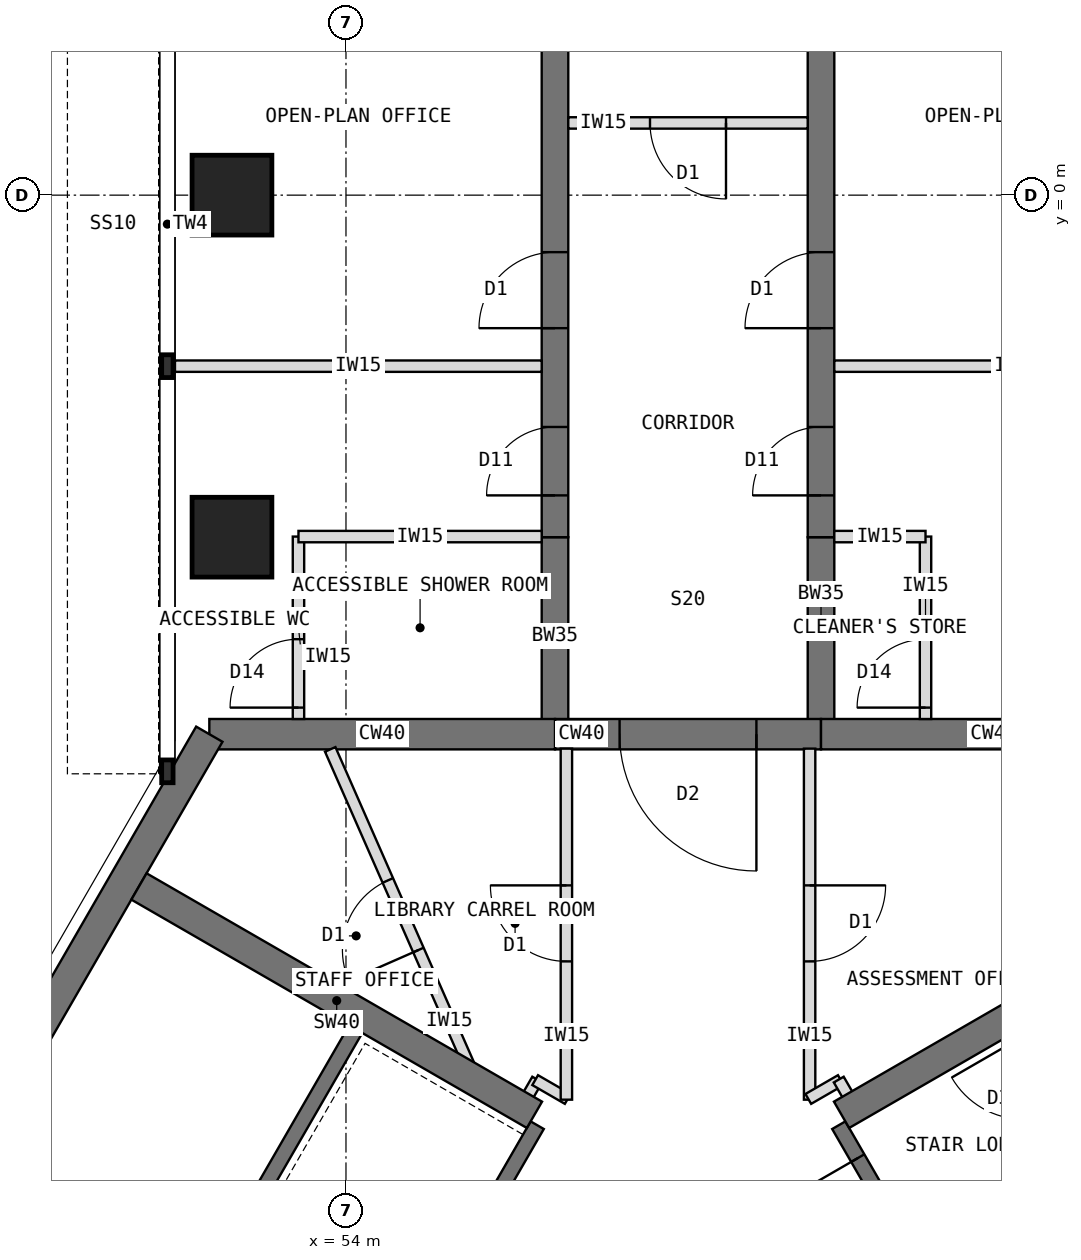
"""IFC4 building model, lengths in metres.
Left out: names, types, materials, properties, quantities, classifications, styles, units other than length and angle.
Written with IfcOpenShell. Run it as: python <this file> out.ifc"""

import sys

from ifc_helpers import new_model, si_unit, direction, frame, frame_2d, origin, origin_2d, place, context, subcontext, project, spatial, rectangle, extrude, element, fill, save


model = new_model("IFC4")
c1 = context("Model", 3, precision=1e-05, world=origin(), true_north=direction((0.0, 1.0)))
c2 = subcontext(c1, "Body", "Model", "MODEL_VIEW")
j1 = project(units=[si_unit("LENGTHUNIT", "METRE"), si_unit("PLANEANGLEUNIT", "RADIAN")], contexts=[c1])
p1 = place(None, origin())
s1 = spatial("IfcSite", under=j1, at=p1, CompositionType="ELEMENT")
p2 = place(p1, origin())
s2 = spatial("IfcBuilding", under=s1, at=p2, CompositionType="ELEMENT")
p3 = place(p2, frame((0.0, 0.0, 247.5)))
s3 = spatial("IfcBuildingStorey", under=s2, at=p3, CompositionType="ELEMENT", Elevation=247.5)
p4 = place(p3, frame((64.798, -7.092, 0.0), z_axis=(0.0, 0.0, 1.0), x_axis=(-1.0, 0.0, 0.0)))
e1 = element("IfcWall", 1, at=p4, inside=s3, PredefinedType="SHEAR", context=c2, shape_type="SweptSolid", body=[
    extrude(rectangle(XDim=4.548, YDim=0.4, at=frame_2d((2.274, 0.0))), origin(), (0.0, 0.0, 1.0), 4.0),
])
p5 = place(p3, frame((60.25, -7.092, 0.0), z_axis=(0.0, 0.0, 1.0), x_axis=(-1.0, 0.0, 0.0)))
e2 = element("IfcWall", 2, at=p5, inside=s3, PredefinedType="SHEAR", context=c2, shape_type="SweptSolid", body=[
    extrude(rectangle(XDim=3.5, YDim=0.4, at=frame_2d((1.75, 0.0))), origin(), (0.0, 0.0, 1.0), 4.0),
])
p6 = place(p5, frame((0.85, 0.0, 0.0)))
e3 = element("IfcOpeningElement", 3, at=p6, cuts=e2, PredefinedType="OPENING", context=c2, shape_type="SweptSolid", body=[
    extrude(rectangle(XDim=1.8, YDim=2.1, at=frame_2d((0.9, 1.05))), frame((0.0, 0.21, 0.0), z_axis=(0.0, -1.0, 0.0), x_axis=(1.0, 0.0, 0.0)), (0.0, 0.0, 1.0), 0.42),
])
p7 = place(p3, frame((56.75, -7.092, 0.0), z_axis=(0.0, 0.0, 1.0), x_axis=(-1.0, 0.0, 0.0)))
e4 = element("IfcWall", 4, at=p7, inside=s3, PredefinedType="SHEAR", context=c2, shape_type="SweptSolid", body=[
    extrude(rectangle(XDim=4.548, YDim=0.4, at=frame_2d((2.274, 0.0))), origin(), (0.0, 0.0, 1.0), 4.0),
])
p8 = place(p3, frame((52.202, -7.092, 0.0), z_axis=(0.0, 0.0, 1.0), x_axis=(-0.500005998175, -0.866021940709, 0.0)))
e5 = element("IfcWall", 5, at=p8, inside=s3, PredefinedType="SHEAR", context=c2, shape_type="SweptSolid", body=[
    extrude(rectangle(XDim=12.596, YDim=0.4, at=frame_2d((6.298, 0.0))), origin(), (0.0, 0.0, 1.0), 4.0),
])
p9 = place(p3, frame((56.75, -7.092, 0.0), z_axis=(0.0, 0.0, 1.0), x_axis=(0.0, 1.0, 0.0)))
e6 = element("IfcWall", 6, at=p9, inside=s3, PredefinedType="SHEAR", context=c2, shape_type="SweptSolid", body=[
    extrude(rectangle(XDim=2.592, YDim=0.35, at=frame_2d((1.296, 0.0))), origin(), (0.0, 0.0, 1.0), 4.0),
])
p10 = place(p3, frame((56.75, -4.5, 0.0), z_axis=(0.0, 0.0, 1.0), x_axis=(0.0, 1.0, 0.0)))
e7 = element("IfcWall", 7, at=p10, inside=s3, PredefinedType="SHEAR", context=c2, shape_type="SweptSolid", body=[
    extrude(rectangle(XDim=13.2, YDim=0.35, at=frame_2d((6.6, 0.0))), origin(), (0.0, 0.0, 1.0), 4.0),
])
p11 = place(p10, frame((0.55, 0.0, 0.0)))
e8 = element("IfcOpeningElement", 8, at=p11, cuts=e7, PredefinedType="OPENING", context=c2, shape_type="SweptSolid", body=[
    extrude(rectangle(XDim=0.9, YDim=2.1, at=frame_2d((0.45, 1.05))), frame((0.0, 0.185, 0.0), z_axis=(0.0, -1.0, 0.0), x_axis=(1.0, 0.0, 0.0)), (0.0, 0.0, 1.0), 0.37),
])
p12 = place(p10, frame((2.75, 0.0, 0.0)))
e9 = element("IfcOpeningElement", 9, at=p12, cuts=e7, PredefinedType="OPENING", context=c2, shape_type="SweptSolid", body=[
    extrude(rectangle(XDim=1.0, YDim=2.1, at=frame_2d((0.5, 1.05))), frame((0.0, 0.185, 0.0), z_axis=(0.0, -1.0, 0.0), x_axis=(1.0, 0.0, 0.0)), (0.0, 0.0, 1.0), 0.37),
])
p13 = place(p3, frame((60.25, -7.092, 0.0), z_axis=(0.0, 0.0, 1.0), x_axis=(0.0, 1.0, 0.0)))
e10 = element("IfcWall", 10, at=p13, inside=s3, PredefinedType="SHEAR", context=c2, shape_type="SweptSolid", body=[
    extrude(rectangle(XDim=2.592, YDim=0.35, at=frame_2d((1.296, 0.0))), origin(), (0.0, 0.0, 1.0), 4.0),
])
p14 = place(p3, frame((60.25, -4.5, 0.0), z_axis=(0.0, 0.0, 1.0), x_axis=(0.0, 1.0, 0.0)))
e11 = element("IfcWall", 11, at=p14, inside=s3, PredefinedType="SHEAR", context=c2, shape_type="SweptSolid", body=[
    extrude(rectangle(XDim=13.2, YDim=0.35, at=frame_2d((6.6, 0.0))), origin(), (0.0, 0.0, 1.0), 4.0),
])
p15 = place(p14, frame((0.55, 0.0, 0.0)))
e12 = element("IfcOpeningElement", 12, at=p15, cuts=e11, PredefinedType="OPENING", context=c2, shape_type="SweptSolid", body=[
    extrude(rectangle(XDim=0.9, YDim=2.1, at=frame_2d((0.45, 1.05))), frame((0.0, 0.185, 0.0), z_axis=(0.0, -1.0, 0.0), x_axis=(1.0, 0.0, 0.0)), (0.0, 0.0, 1.0), 0.37),
])
p16 = place(p14, frame((2.75, 0.0, 0.0)))
e13 = element("IfcOpeningElement", 13, at=p16, cuts=e11, PredefinedType="OPENING", context=c2, shape_type="SweptSolid", body=[
    extrude(rectangle(XDim=1.0, YDim=2.1, at=frame_2d((0.5, 1.05))), frame((0.0, 0.185, 0.0), z_axis=(0.0, -1.0, 0.0), x_axis=(1.0, 0.0, 0.0)), (0.0, 0.0, 1.0), 0.37),
])
for number, where, z_axis, x_axis in (
    (14, (52.5, -4.5, 0.0), (0.0, 0.0, 1.0), (1.0, 0.0, 0.0)),
    (15, (52.5, 0.0, 0.0), (0.0, 0.0, 1.0), (1.0, 0.0, 0.0)),
):
    element("IfcColumn", number, at=place(p3, frame(where, z_axis=z_axis, x_axis=x_axis)), inside=s3, PredefinedType="COLUMN", context=c2, shape_type="SweptSolid", body=[
        extrude(rectangle(XDim=1.05, YDim=1.05, at=origin_2d()), origin(), (0.0, 0.0, 1.0), 4.0),
    ])
p17 = place(p3, frame((56.516, -12.236, 0.0), z_axis=(0.0, 0.0, 1.0), x_axis=(-0.49999894854, -0.866026010844, 0.0)))
e16 = element("IfcWall", 16, at=p17, inside=s3, PredefinedType="SHEAR", context=c2, shape_type="SweptSolid", body=[
    extrude(rectangle(XDim=8.0, YDim=0.2, at=frame_2d((4.0, 0.0))), origin(), (0.0, 0.0, 1.0), 4.0),
])
p18 = place(p17, frame((6.3, 0.0, 0.0)))
e17 = element("IfcOpeningElement", 17, at=p18, cuts=e16, PredefinedType="OPENING", context=c2, shape_type="SweptSolid", body=[
    extrude(rectangle(XDim=1.2, YDim=2.1, at=frame_2d((0.6, 1.05))), frame((0.0, 0.11, 0.0), z_axis=(0.0, -1.0, 0.0), x_axis=(1.0, 0.0, 0.0)), (0.0, 0.0, 1.0), 0.22),
])
p19 = place(p3, frame((54.178, -10.886, 0.0), z_axis=(0.0, 0.0, 1.0), x_axis=(-0.49999894854, -0.866026010844, 0.0)))
e18 = element("IfcWall", 18, at=p19, inside=s3, PredefinedType="SHEAR", context=c2, shape_type="SweptSolid", body=[
    extrude(rectangle(XDim=8.0, YDim=0.2, at=frame_2d((4.0, 0.0))), origin(), (0.0, 0.0, 1.0), 4.0),
])
p20 = place(p19, frame((6.8, 0.0, 0.0)))
e19 = element("IfcOpeningElement", 19, at=p20, cuts=e18, PredefinedType="OPENING", context=c2, shape_type="SweptSolid", body=[
    extrude(rectangle(XDim=0.9, YDim=2.1, at=frame_2d((0.45, 1.05))), frame((0.0, 0.11, 0.0), z_axis=(0.0, -1.0, 0.0), x_axis=(1.0, 0.0, 0.0)), (0.0, 0.0, 1.0), 0.22),
])
p21 = place(p3, frame((56.48, -12.099, 0.0), z_axis=(0.0, 0.0, 1.0), x_axis=(-0.866026570101, 0.499997979876, 0.0)))
e20 = element("IfcWall", 20, at=p21, inside=s3, PredefinedType="SHEAR", context=c2, shape_type="SweptSolid", body=[
    extrude(rectangle(XDim=6.008, YDim=0.4, at=frame_2d((3.004, 0.0))), origin(), (0.0, 0.0, 1.0), 4.0),
])
p22 = place(p3, frame((64.484, -19.164, 0.0), z_axis=(0.0, 0.0, 1.0), x_axis=(-0.49999894854, 0.866026010844, 0.0)))
e21 = element("IfcWall", 21, at=p22, inside=s3, PredefinedType="SHEAR", context=c2, shape_type="SweptSolid", body=[
    extrude(rectangle(XDim=8.0, YDim=0.2, at=frame_2d((4.0, 0.0))), origin(), (0.0, 0.0, 1.0), 4.0),
])
p23 = place(p22, frame((6.3, 0.0, 0.0)))
e22 = element("IfcOpeningElement", 22, at=p23, cuts=e21, PredefinedType="OPENING", context=c2, shape_type="SweptSolid", body=[
    extrude(rectangle(XDim=1.2, YDim=2.1, at=frame_2d((0.6, 1.05))), frame((0.0, 0.11, 0.0), z_axis=(0.0, -1.0, 0.0), x_axis=(1.0, 0.0, 0.0)), (0.0, 0.0, 1.0), 0.22),
])
p24 = place(p22, frame((0.9, 0.0, 0.0)))
e23 = element("IfcOpeningElement", 23, at=p24, cuts=e21, PredefinedType="OPENING", context=c2, shape_type="SweptSolid", body=[
    extrude(rectangle(XDim=1.1, YDim=2.2, at=frame_2d((0.55, 1.1))), frame((0.0, 0.11, 0.0), z_axis=(0.0, -1.0, 0.0), x_axis=(1.0, 0.0, 0.0)), (0.0, 0.0, 1.0), 0.22),
])
p25 = place(p22, frame((3.8, 0.0, 0.0)))
e24 = element("IfcOpeningElement", 24, at=p25, cuts=e21, PredefinedType="OPENING", context=c2, shape_type="SweptSolid", body=[
    extrude(rectangle(XDim=1.1, YDim=2.2, at=frame_2d((0.55, 1.1))), frame((0.0, 0.11, 0.0), z_axis=(0.0, -1.0, 0.0), x_axis=(1.0, 0.0, 0.0)), (0.0, 0.0, 1.0), 0.22),
])
p26 = place(p3, frame((61.67, -14.091, 0.0), z_axis=(0.0, 0.0, 1.0), x_axis=(0.86603858612, 0.49997716683, 0.0)))
e25 = element("IfcWall", 25, at=p26, inside=s3, PredefinedType="SHEAR", context=c2, shape_type="SweptSolid", body=[
    extrude(rectangle(XDim=2.6, YDim=0.2, at=frame_2d((1.3, 0.0))), origin(), (0.0, 0.0, 1.0), 4.0),
])
p27 = place(p3, frame((60.52, -12.099, 0.0), z_axis=(0.0, 0.0, 1.0), x_axis=(0.866026570101, 0.499997979876, 0.0)))
e26 = element("IfcWall", 26, at=p27, inside=s3, PredefinedType="SHEAR", context=c2, shape_type="SweptSolid", body=[
    extrude(rectangle(XDim=6.008, YDim=0.4, at=frame_2d((3.004, 0.0))), origin(), (0.0, 0.0, 1.0), 4.0),
])
p28 = place(p3, frame((56.575, -2.25, 0.0), z_axis=(0.0, 0.0, 1.0), x_axis=(-1.0, 0.0, 0.0)))
e27 = element("IfcWall", 27, at=p28, inside=s3, PredefinedType="PARTITIONING", context=c2, shape_type="SweptSolid", body=[
    extrude(rectangle(XDim=4.825, YDim=0.15, at=frame_2d((2.413, 0.0))), origin(), (0.0, 0.0, 1.0), 3.8),
])
p29 = place(p3, frame((53.375, -6.892, 0.0), z_axis=(0.0, 0.0, 1.0), x_axis=(0.0, 1.0, 0.0)))
e28 = element("IfcWall", 28, at=p29, inside=s3, PredefinedType="PARTITIONING", context=c2, shape_type="SweptSolid", body=[
    extrude(rectangle(XDim=2.4, YDim=0.15, at=frame_2d((1.2, 0.0))), origin(), (0.0, 0.0, 1.0), 3.8),
])
p30 = place(p29, frame((0.15, 0.0, 0.0)))
e29 = element("IfcOpeningElement", 29, at=p30, cuts=e28, PredefinedType="OPENING", context=c2, shape_type="SweptSolid", body=[
    extrude(rectangle(XDim=0.9, YDim=2.1, at=frame_2d((0.45, 1.05))), frame((0.0, 0.085, 0.0), z_axis=(0.0, -1.0, 0.0), x_axis=(1.0, 0.0, 0.0)), (0.0, 0.0, 1.0), 0.17),
])
p31 = place(p3, frame((56.575, -4.492, 0.0), z_axis=(0.0, 0.0, 1.0), x_axis=(-1.0, 0.0, 0.0)))
e30 = element("IfcWall", 30, at=p31, inside=s3, PredefinedType="PARTITIONING", context=c2, shape_type="SweptSolid", body=[
    extrude(rectangle(XDim=3.2, YDim=0.15, at=frame_2d((1.6, 0.0))), origin(), (0.0, 0.0, 1.0), 3.267),
])
p32 = place(p3, frame((60.425, -2.25, 0.0), z_axis=(0.0, 0.0, 1.0), x_axis=(1.0, 0.0, 0.0)))
e31 = element("IfcWall", 31, at=p32, inside=s3, PredefinedType="PARTITIONING", context=c2, shape_type="SweptSolid", body=[
    extrude(rectangle(XDim=4.825, YDim=0.15, at=frame_2d((2.413, 0.0))), origin(), (0.0, 0.0, 1.0), 3.8),
])
p33 = place(p3, frame((61.625, -6.892, 0.0), z_axis=(0.0, 0.0, 1.0), x_axis=(0.0, 1.0, 0.0)))
e32 = element("IfcWall", 32, at=p33, inside=s3, PredefinedType="PARTITIONING", context=c2, shape_type="SweptSolid", body=[
    extrude(rectangle(XDim=2.4, YDim=0.15, at=frame_2d((1.2, 0.0))), origin(), (0.0, 0.0, 1.0), 3.8),
])
p34 = place(p33, frame((0.15, 0.0, 0.0)))
e33 = element("IfcOpeningElement", 33, at=p34, cuts=e32, PredefinedType="OPENING", context=c2, shape_type="SweptSolid", body=[
    extrude(rectangle(XDim=0.9, YDim=2.1, at=frame_2d((0.45, 1.05))), frame((0.0, 0.085, 0.0), z_axis=(0.0, -1.0, 0.0), x_axis=(1.0, 0.0, 0.0)), (0.0, 0.0, 1.0), 0.17),
])
p35 = place(p3, frame((60.425, -4.492, 0.0), z_axis=(0.0, 0.0, 1.0), x_axis=(1.0, 0.0, 0.0)))
e34 = element("IfcWall", 34, at=p35, inside=s3, PredefinedType="PARTITIONING", context=c2, shape_type="SweptSolid", body=[
    extrude(rectangle(XDim=1.2, YDim=0.15, at=frame_2d((0.6, 0.0))), origin(), (0.0, 0.0, 1.0), 3.267),
])
p36 = place(p3, frame((56.302, -12.008, 0.0), z_axis=(0.0, 0.0, 1.0), x_axis=(0.500230298122, 0.865892400268, 0.0)))
e35 = element("IfcWall", 35, at=p36, inside=s3, PredefinedType="PARTITIONING", context=c2, shape_type="SweptSolid", body=[
    extrude(rectangle(XDim=0.43, YDim=0.15, at=frame_2d((0.215, 0.0))), origin(), (0.0, 0.0, 1.0), 3.8),
])
p37 = place(p3, frame((56.489, -11.643, 0.0), z_axis=(0.0, 0.0, 1.0), x_axis=(0.865831790172, -0.50033519877, 0.0)))
e36 = element("IfcWall", 36, at=p37, inside=s3, PredefinedType="PARTITIONING", context=c2, shape_type="SweptSolid", body=[
    extrude(rectangle(XDim=0.494, YDim=0.15, at=frame_2d((0.247, 0.0))), origin(), (0.0, 0.0, 1.0), 3.8),
])
p38 = place(p3, frame((56.9, -11.9, 0.0), z_axis=(0.0, 0.0, 1.0), x_axis=(0.0, 1.0, 0.0)))
e37 = element("IfcWall", 37, at=p38, inside=s3, PredefinedType="PARTITIONING", context=c2, shape_type="SweptSolid", body=[
    extrude(rectangle(XDim=4.618, YDim=0.15, at=frame_2d((2.309, 0.0))), origin(), (0.0, 0.0, 1.0), 3.8),
])
p39 = place(p38, frame((1.819, 0.0, 0.0)))
e38 = element("IfcOpeningElement", 38, at=p39, cuts=e37, PredefinedType="OPENING", context=c2, shape_type="SweptSolid", body=[
    extrude(rectangle(XDim=1.0, YDim=2.1, at=frame_2d((0.5, 1.05))), frame((0.0, 0.085, 0.0), z_axis=(0.0, -1.0, 0.0), x_axis=(1.0, 0.0, 0.0)), (0.0, 0.0, 1.0), 0.17),
])
p40 = place(p3, frame((60.1, -7.282, 0.0), z_axis=(0.0, 0.0, 1.0), x_axis=(0.0, -1.0, 0.0)))
e39 = element("IfcWall", 39, at=p40, inside=s3, PredefinedType="PARTITIONING", context=c2, shape_type="SweptSolid", body=[
    extrude(rectangle(XDim=4.618, YDim=0.15, at=frame_2d((2.309, 0.0))), origin(), (0.0, 0.0, 1.0), 3.8),
])
p41 = place(p40, frame((1.799, 0.0, 0.0)))
e40 = element("IfcOpeningElement", 40, at=p41, cuts=e39, PredefinedType="OPENING", context=c2, shape_type="SweptSolid", body=[
    extrude(rectangle(XDim=1.0, YDim=2.1, at=frame_2d((0.5, 1.05))), frame((0.0, 0.085, 0.0), z_axis=(0.0, -1.0, 0.0), x_axis=(1.0, 0.0, 0.0)), (0.0, 0.0, 1.0), 0.17),
])
p42 = place(p3, frame((60.083, -11.89, 0.0), z_axis=(0.0, 0.0, 1.0), x_axis=(0.865831790172, 0.50033519877, 0.0)))
e41 = element("IfcWall", 41, at=p42, inside=s3, PredefinedType="PARTITIONING", context=c2, shape_type="SweptSolid", body=[
    extrude(rectangle(XDim=0.494, YDim=0.15, at=frame_2d((0.247, 0.0))), origin(), (0.0, 0.0, 1.0), 3.8),
])
p43 = place(p3, frame((60.483, -11.635, 0.0), z_axis=(0.0, 0.0, 1.0), x_axis=(0.500230298122, -0.865892400268, 0.0)))
e42 = element("IfcWall", 42, at=p43, inside=s3, PredefinedType="PARTITIONING", context=c2, shape_type="SweptSolid", body=[
    extrude(rectangle(XDim=0.43, YDim=0.15, at=frame_2d((0.215, 0.0))), origin(), (0.0, 0.0, 1.0), 3.8),
])
p44 = place(p3, frame((55.711, -11.656, 0.0), z_axis=(0.0, 0.0, 1.0), x_axis=(-0.402457111937, 0.915438841787, 0.0)))
e43 = element("IfcWall", 43, at=p44, inside=s3, PredefinedType="PARTITIONING", context=c2, shape_type="SweptSolid", body=[
    extrude(rectangle(XDim=4.767, YDim=0.15, at=frame_2d((2.383, 0.0))), origin(), (0.0, 0.0, 1.0), 3.8),
])
p45 = place(p44, frame((1.883, 0.0, 0.0)))
e44 = element("IfcOpeningElement", 44, at=p45, cuts=e43, PredefinedType="OPENING", context=c2, shape_type="SweptSolid", body=[
    extrude(rectangle(XDim=1.0, YDim=2.1, at=frame_2d((0.5, 1.05))), frame((0.0, 0.085, 0.0), z_axis=(0.0, -1.0, 0.0), x_axis=(1.0, 0.0, 0.0)), (0.0, 0.0, 1.0), 0.17),
])
p46 = place(p3, frame((60.075, 0.95, 0.0), z_axis=(0.0, 0.0, 1.0), x_axis=(-1.0, 0.0, 0.0)))
e45 = element("IfcWall", 45, at=p46, inside=s3, PredefinedType="PARTITIONING", context=c2, shape_type="SweptSolid", body=[
    extrude(rectangle(XDim=3.15, YDim=0.15, at=frame_2d((1.575, 0.0))), origin(), (0.0, 0.0, 1.0), 3.8),
])
p47 = place(p46, frame((1.075, 0.0, 0.0)))
e46 = element("IfcOpeningElement", 46, at=p47, cuts=e45, PredefinedType="OPENING", context=c2, shape_type="SweptSolid", body=[
    extrude(rectangle(XDim=1.0, YDim=2.1, at=frame_2d((0.5, 1.05))), frame((0.0, 0.085, 0.0), z_axis=(0.0, -1.0, 0.0), x_axis=(1.0, 0.0, 0.0)), (0.0, 0.0, 1.0), 0.17),
])
p48 = place(p23, origin())
e47 = element("IfcDoor", 47, at=p48, inside=s3, OperationType="SINGLE_SWING_RIGHT", PredefinedType="DOOR", context=c2, shape_type="SweptSolid", body=[
    extrude(rectangle(XDim=1.2, YDim=2.1, at=frame_2d((0.6, 1.05))), frame((0.0, 0.025, 0.0), z_axis=(0.0, -1.0, 0.0), x_axis=(1.0, 0.0, 0.0)), (0.0, 0.0, 1.0), 0.05),
])
fill(e22, e47)
p49 = place(p6, origin())
e48 = element("IfcDoor", 48, at=p49, inside=s3, OperationType="DOUBLE_DOOR_DOUBLE_SWING", PredefinedType="DOOR", context=c2, shape_type="SweptSolid", body=[
    extrude(rectangle(XDim=1.8, YDim=2.1, at=frame_2d((0.9, 1.05))), frame((0.0, 0.025, 0.0), z_axis=(0.0, -1.0, 0.0), x_axis=(1.0, 0.0, 0.0)), (0.0, 0.0, 1.0), 0.05),
])
fill(e3, e48)
p50 = place(p30, origin())
e49 = element("IfcDoor", 49, at=p50, inside=s3, OperationType="SINGLE_SWING_LEFT", PredefinedType="DOOR", context=c2, shape_type="SweptSolid", body=[
    extrude(rectangle(XDim=0.9, YDim=2.1, at=frame_2d((0.45, 1.05))), frame((0.0, 0.025, 0.0), z_axis=(0.0, -1.0, 0.0), x_axis=(1.0, 0.0, 0.0)), (0.0, 0.0, 1.0), 0.05),
])
fill(e29, e49)
p51 = place(p34, origin())
e50 = element("IfcDoor", 50, at=p51, inside=s3, OperationType="SINGLE_SWING_LEFT", PredefinedType="DOOR", context=c2, shape_type="SweptSolid", body=[
    extrude(rectangle(XDim=0.9, YDim=2.1, at=frame_2d((0.45, 1.05))), frame((0.0, 0.025, 0.0), z_axis=(0.0, -1.0, 0.0), x_axis=(1.0, 0.0, 0.0)), (0.0, 0.0, 1.0), 0.05),
])
fill(e33, e50)
p52 = place(p41, origin())
e51 = element("IfcDoor", 51, at=p52, inside=s3, OperationType="SINGLE_SWING_LEFT", PredefinedType="DOOR", context=c2, shape_type="SweptSolid", body=[
    extrude(rectangle(XDim=1.0, YDim=2.1, at=frame_2d((0.5, 1.05))), frame((0.0, 0.025, 0.0), z_axis=(0.0, -1.0, 0.0), x_axis=(1.0, 0.0, 0.0)), (0.0, 0.0, 1.0), 0.05),
])
fill(e40, e51)
p53 = place(p45, origin())
e52 = element("IfcDoor", 52, at=p53, inside=s3, OperationType="SINGLE_SWING_LEFT", PredefinedType="DOOR", context=c2, shape_type="SweptSolid", body=[
    extrude(rectangle(XDim=1.0, YDim=2.1, at=frame_2d((0.5, 1.05))), frame((0.0, 0.025, 0.0), z_axis=(0.0, -1.0, 0.0), x_axis=(1.0, 0.0, 0.0)), (0.0, 0.0, 1.0), 0.05),
])
fill(e44, e52)
p54 = place(p39, origin())
e53 = element("IfcDoor", 53, at=p54, inside=s3, OperationType="SINGLE_SWING_RIGHT", PredefinedType="DOOR", context=c2, shape_type="SweptSolid", body=[
    extrude(rectangle(XDim=1.0, YDim=2.1, at=frame_2d((0.5, 1.05))), frame((0.0, 0.025, 0.0), z_axis=(0.0, -1.0, 0.0), x_axis=(1.0, 0.0, 0.0)), (0.0, 0.0, 1.0), 0.05),
])
fill(e38, e53)
p55 = place(p47, origin())
e54 = element("IfcDoor", 54, at=p55, inside=s3, OperationType="SINGLE_SWING_LEFT", PredefinedType="DOOR", context=c2, shape_type="SweptSolid", body=[
    extrude(rectangle(XDim=1.0, YDim=2.1, at=frame_2d((0.5, 1.05))), frame((0.0, 0.025, 0.0), z_axis=(0.0, -1.0, 0.0), x_axis=(1.0, 0.0, 0.0)), (0.0, 0.0, 1.0), 0.05),
])
fill(e46, e54)
p56 = place(p11, origin())
e55 = element("IfcDoor", 55, at=p56, inside=s3, OperationType="SINGLE_SWING_LEFT", PredefinedType="DOOR", context=c2, shape_type="SweptSolid", body=[
    extrude(rectangle(XDim=0.9, YDim=2.1, at=frame_2d((0.45, 1.05))), frame((0.0, 0.025, 0.0), z_axis=(0.0, -1.0, 0.0), x_axis=(1.0, 0.0, 0.0)), (0.0, 0.0, 1.0), 0.05),
])
fill(e8, e55)
p57 = place(p12, origin())
e56 = element("IfcDoor", 56, at=p57, inside=s3, OperationType="SINGLE_SWING_LEFT", PredefinedType="DOOR", context=c2, shape_type="SweptSolid", body=[
    extrude(rectangle(XDim=1.0, YDim=2.1, at=frame_2d((0.5, 1.05))), frame((0.0, 0.025, 0.0), z_axis=(0.0, -1.0, 0.0), x_axis=(1.0, 0.0, 0.0)), (0.0, 0.0, 1.0), 0.05),
])
fill(e9, e56)
p58 = place(p15, origin())
e57 = element("IfcDoor", 57, at=p58, inside=s3, OperationType="SINGLE_SWING_LEFT", PredefinedType="DOOR", context=c2, shape_type="SweptSolid", body=[
    extrude(rectangle(XDim=0.9, YDim=2.1, at=frame_2d((0.45, 1.05))), frame((0.0, 0.025, 0.0), z_axis=(0.0, -1.0, 0.0), x_axis=(1.0, 0.0, 0.0)), (0.0, 0.0, 1.0), 0.05),
])
fill(e12, e57)
p59 = place(p16, origin())
e58 = element("IfcDoor", 58, at=p59, inside=s3, OperationType="SINGLE_SWING_LEFT", PredefinedType="DOOR", context=c2, shape_type="SweptSolid", body=[
    extrude(rectangle(XDim=1.0, YDim=2.1, at=frame_2d((0.5, 1.05))), frame((0.0, 0.025, 0.0), z_axis=(0.0, -1.0, 0.0), x_axis=(1.0, 0.0, 0.0)), (0.0, 0.0, 1.0), 0.05),
])
fill(e13, e58)
save(model, sys.argv[1])
